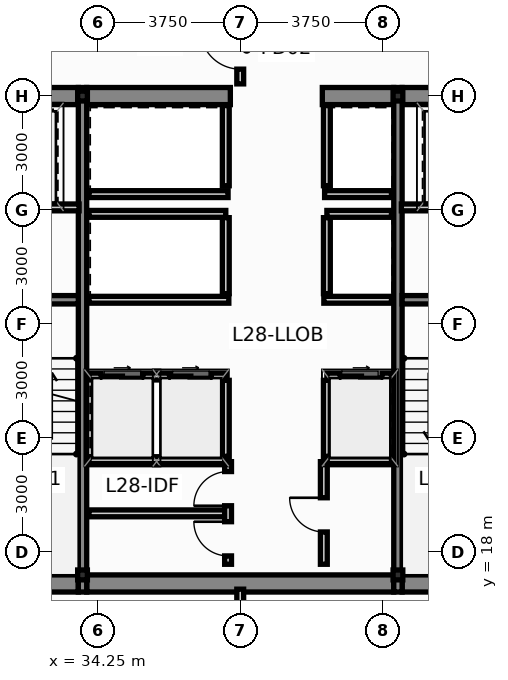
"""IFC4 building model, lengths in metres.
Left out: names, types, materials, properties, quantities, classifications, styles, units other than length and angle.
Written with IfcOpenShell. Run it as: python <this file> out.ifc"""

import sys

from ifc_helpers import new_model, si_unit, direction, frame, frame_2d, origin, origin_2d, place, context, subcontext, project, spatial, rectangle, i_section, extrude, source, transform, mapped, element, fill, save


model = new_model("IFC4")
c1 = context("Model", 3, precision=1e-05, world=origin(), true_north=direction((0.0, 1.0)))
c2 = subcontext(c1, "Body", "Model", "MODEL_VIEW")
j1 = project(units=[si_unit("LENGTHUNIT", "METRE"), si_unit("PLANEANGLEUNIT", "RADIAN")], contexts=[c1])
p1 = place(None, origin())
s1 = spatial("IfcSite", under=j1, at=p1, CompositionType="ELEMENT")
p2 = place(p1, origin())
s2 = spatial("IfcBuilding", under=s1, at=p2, CompositionType="ELEMENT")
p3 = place(p2, frame((0.0, 0.0, 109.05)))
s3 = spatial("IfcBuildingStorey", under=s2, at=p3, CompositionType="ELEMENT", Elevation=109.05)
m1 = source(origin(), c2, "Body", "SweptSolid", [
    extrude(i_section(OverallWidth=0.256, OverallDepth=0.26, WebThickness=0.01, FlangeThickness=0.017, at=origin_2d()), origin(), (0.0, 0.0, 1.0), 3.65),
])
for number, where, z_axis, x_axis in (
    (1, (33.85, 17.4, 0.0), (0.0, 0.0, 1.0), (1.0, 0.0, 0.0)),
    (2, (42.15, 17.4, 0.0), (0.0, 0.0, 1.0), (1.0, 0.0, 0.0)),
    (3, (33.85, 30.0, 0.0), (0.0, 0.0, 1.0), (1.0, 0.0, 0.0)),
    (4, (42.15, 30.0, 0.0), (0.0, 0.0, 1.0), (1.0, 0.0, 0.0)),
):
    element("IfcColumn", number, at=place(p3, frame(where, z_axis=z_axis, x_axis=x_axis)), inside=s3, PredefinedType="COLUMN", context=c2, shape_type="MappedRepresentation", body=[
        mapped(m1, transform((0.0, 0.0, 0.0), scale=1.0)),
    ])
p4 = place(p3, frame((30.84, 17.175, 0.0), z_axis=(0.0, 0.0, 1.0), x_axis=(1.0, 0.0, 0.0)))
e5 = element("IfcWall", 5, at=p4, inside=s3, PredefinedType="SHEAR", context=c2, shape_type="SweptSolid", body=[
    extrude(rectangle(XDim=2.9, YDim=0.45, at=frame_2d((1.45, 0.0))), origin(), (0.0, 0.0, 1.0), 3.65),
])
p5 = place(p3, frame((33.96, 17.175, 0.0), z_axis=(0.0, 0.0, 1.0), x_axis=(1.0, 0.0, 0.0)))
e6 = element("IfcWall", 6, at=p5, inside=s3, PredefinedType="SHEAR", context=c2, shape_type="SweptSolid", body=[
    extrude(rectangle(XDim=8.08, YDim=0.45, at=frame_2d((4.04, 0.0))), origin(), (0.0, 0.0, 1.0), 3.65),
])
for number, where, z_axis, x_axis in (
    (7, (42.26, 17.175, 0.0), (0.0, 0.0, 1.0), (1.0, 0.0, 0.0)),
    (8, (30.84, 30.0, 0.0), (0.0, 0.0, 1.0), (1.0, 0.0, 0.0)),
):
    element("IfcWall", number, at=place(p3, frame(where, z_axis=z_axis, x_axis=x_axis)), inside=s3, PredefinedType="SHEAR", context=c2, shape_type="SweptSolid", body=[
        extrude(rectangle(XDim=2.9, YDim=0.45, at=frame_2d((1.45, 0.0))), origin(), (0.0, 0.0, 1.0), 3.65),
    ])
p6 = place(p3, frame((33.96, 30.0, 0.0), z_axis=(0.0, 0.0, 1.0), x_axis=(1.0, 0.0, 0.0)))
e9 = element("IfcWall", 9, at=p6, inside=s3, PredefinedType="SHEAR", context=c2, shape_type="SweptSolid", body=[
    extrude(rectangle(XDim=3.78, YDim=0.45, at=frame_2d((1.89, 0.0))), origin(), (0.0, 0.0, 1.0), 3.65),
])
p7 = place(p3, frame((40.16, 30.0, 0.0), z_axis=(0.0, 0.0, 1.0), x_axis=(1.0, 0.0, 0.0)))
e10 = element("IfcWall", 10, at=p7, inside=s3, PredefinedType="SHEAR", context=c2, shape_type="SweptSolid", body=[
    extrude(rectangle(XDim=1.88, YDim=0.45, at=frame_2d((0.94, 0.0))), origin(), (0.0, 0.0, 1.0), 3.65),
])
p8 = place(p3, frame((42.26, 30.0, 0.0), z_axis=(0.0, 0.0, 1.0), x_axis=(1.0, 0.0, 0.0)))
e11 = element("IfcWall", 11, at=p8, inside=s3, PredefinedType="SHEAR", context=c2, shape_type="SweptSolid", body=[
    extrude(rectangle(XDim=2.9, YDim=0.45, at=frame_2d((1.45, 0.0))), origin(), (0.0, 0.0, 1.0), 3.65),
])
for number, where, z_axis, x_axis in (
    (12, (33.85, 16.95, 0.0), (0.0, 0.0, 1.0), (0.0, 1.0, 0.0)),
    (13, (42.15, 16.95, 0.0), (0.0, 0.0, 1.0), (0.0, 1.0, 0.0)),
):
    element("IfcWall", number, at=place(p3, frame(where, z_axis=z_axis, x_axis=x_axis)), inside=s3, PredefinedType="SHEAR", context=c2, shape_type="SweptSolid", body=[
        extrude(rectangle(XDim=13.275, YDim=0.22, at=frame_2d((6.638, 0.0))), origin(), (0.0, 0.0, 1.0), 3.65),
    ])
for number, where, z_axis, x_axis in (
    (14, (30.84, 24.64, 0.0), (0.0, 0.0, 1.0), (1.0, 0.0, 0.0)),
    (15, (42.26, 24.64, 0.0), (0.0, 0.0, 1.0), (1.0, 0.0, 0.0)),
):
    element("IfcWall", number, at=place(p3, frame(where, z_axis=z_axis, x_axis=x_axis)), inside=s3, PredefinedType="SHEAR", context=c2, shape_type="SweptSolid", body=[
        extrude(rectangle(XDim=2.9, YDim=0.22, at=frame_2d((1.45, 0.0))), origin(), (0.0, 0.0, 1.0), 3.65),
    ])
p9 = place(p3, frame((34.02, 22.62, 0.0), z_axis=(0.0, 0.0, 1.0), x_axis=(1.0, 0.0, 0.0)))
e16 = element("IfcWall", 16, at=p9, inside=s3, PredefinedType="PARTITIONING", context=c2, shape_type="SweptSolid", body=[
    extrude(rectangle(XDim=3.6, YDim=0.18, at=frame_2d((1.8, 0.0))), origin(), (0.0, 0.0, 1.0), 3.4),
])
p10 = place(p9, frame((0.32, 0.0, 0.0)))
e17 = element("IfcOpeningElement", 17, at=p10, cuts=e16, PredefinedType="OPENING", context=c2, shape_type="SweptSolid", body=[
    extrude(rectangle(XDim=1.1, YDim=2.2, at=frame_2d((0.55, 1.1))), frame((0.0, 0.102, 0.0), z_axis=(0.0, -1.0, 0.0), x_axis=(1.0, 0.0, 0.0)), (0.0, 0.0, 1.0), 0.204),
])
p11 = place(p9, frame((2.12, 0.0, 0.0)))
e18 = element("IfcOpeningElement", 18, at=p11, cuts=e16, PredefinedType="OPENING", context=c2, shape_type="SweptSolid", body=[
    extrude(rectangle(XDim=1.1, YDim=2.2, at=frame_2d((0.55, 1.1))), frame((0.0, 0.102, 0.0), z_axis=(0.0, -1.0, 0.0), x_axis=(1.0, 0.0, 0.0)), (0.0, 0.0, 1.0), 0.204),
])
p12 = place(p3, frame((40.28, 22.62, 0.0), z_axis=(0.0, 0.0, 1.0), x_axis=(1.0, 0.0, 0.0)))
e19 = element("IfcWall", 19, at=p12, inside=s3, PredefinedType="PARTITIONING", context=c2, shape_type="SweptSolid", body=[
    extrude(rectangle(XDim=1.7, YDim=0.18, at=frame_2d((0.85, 0.0))), origin(), (0.0, 0.0, 1.0), 3.4),
])
p13 = place(p12, frame((0.35, 0.0, 0.0)))
e20 = element("IfcOpeningElement", 20, at=p13, cuts=e19, PredefinedType="OPENING", context=c2, shape_type="SweptSolid", body=[
    extrude(rectangle(XDim=1.1, YDim=2.2, at=frame_2d((0.55, 1.1))), frame((0.0, 0.102, 0.0), z_axis=(0.0, -1.0, 0.0), x_axis=(1.0, 0.0, 0.0)), (0.0, 0.0, 1.0), 0.204),
])
for number, where, z_axis, x_axis in (
    (21, (37.62, 20.52, 0.0), (0.0, 0.0, 1.0), (0.0, 1.0, 0.0)),
    (22, (40.28, 20.52, 0.0), (0.0, 0.0, 1.0), (0.0, 1.0, 0.0)),
):
    element("IfcWall", number, at=place(p3, frame(where, z_axis=z_axis, x_axis=x_axis)), inside=s3, PredefinedType="PARTITIONING", context=c2, shape_type="SweptSolid", body=[
        extrude(rectangle(XDim=2.0, YDim=0.18, at=frame_2d((1.0, 0.0))), origin(), (0.0, 0.0, 1.0), 3.4),
    ])
p14 = place(p3, frame((34.02, 26.9, 0.0), z_axis=(0.0, 0.0, 1.0), x_axis=(1.0, 0.0, 0.0)))
e23 = element("IfcWall", 23, at=p14, inside=s3, PredefinedType="PARTITIONING", context=c2, shape_type="SweptSolid", body=[
    extrude(rectangle(XDim=3.6, YDim=0.18, at=frame_2d((1.8, 0.0))), origin(), (0.0, 0.0, 1.0), 3.4),
])
p15 = place(p3, frame((40.28, 26.9, 0.0), z_axis=(0.0, 0.0, 1.0), x_axis=(1.0, 0.0, 0.0)))
e24 = element("IfcWall", 24, at=p15, inside=s3, PredefinedType="PARTITIONING", context=c2, shape_type="SweptSolid", body=[
    extrude(rectangle(XDim=1.7, YDim=0.18, at=frame_2d((0.85, 0.0))), origin(), (0.0, 0.0, 1.0), 3.4),
])
for number, where, z_axis, x_axis in (
    (25, (37.62, 24.8, 0.0), (0.0, 0.0, 1.0), (0.0, 1.0, 0.0)),
    (26, (40.28, 24.8, 0.0), (0.0, 0.0, 1.0), (0.0, 1.0, 0.0)),
):
    element("IfcWall", number, at=place(p3, frame(where, z_axis=z_axis, x_axis=x_axis)), inside=s3, PredefinedType="PARTITIONING", context=c2, shape_type="SweptSolid", body=[
        extrude(rectangle(XDim=2.0, YDim=0.18, at=frame_2d((1.0, 0.0))), origin(), (0.0, 0.0, 1.0), 3.4),
    ])
p16 = place(p3, frame((34.02, 24.64, 0.0), z_axis=(0.0, 0.0, 1.0), x_axis=(1.0, 0.0, 0.0)))
e27 = element("IfcWall", 27, at=p16, inside=s3, PredefinedType="PARTITIONING", context=c2, shape_type="SweptSolid", body=[
    extrude(rectangle(XDim=3.68, YDim=0.18, at=frame_2d((1.84, 0.0))), origin(), (0.0, 0.0, 1.0), 3.4),
])
p17 = place(p3, frame((40.2, 24.64, 0.0), z_axis=(0.0, 0.0, 1.0), x_axis=(1.0, 0.0, 0.0)))
e28 = element("IfcWall", 28, at=p17, inside=s3, PredefinedType="PARTITIONING", context=c2, shape_type="SweptSolid", body=[
    extrude(rectangle(XDim=1.78, YDim=0.18, at=frame_2d((0.89, 0.0))), origin(), (0.0, 0.0, 1.0), 3.4),
])
p18 = place(p3, frame((34.02, 27.42, 0.0), z_axis=(0.0, 0.0, 1.0), x_axis=(1.0, 0.0, 0.0)))
e29 = element("IfcWall", 29, at=p18, inside=s3, PredefinedType="PARTITIONING", context=c2, shape_type="SweptSolid", body=[
    extrude(rectangle(XDim=3.66, YDim=0.18, at=frame_2d((1.83, 0.0))), origin(), (0.0, 0.0, 1.0), 3.4),
])
p19 = place(p3, frame((40.22, 27.42, 0.0), z_axis=(0.0, 0.0, 1.0), x_axis=(1.0, 0.0, 0.0)))
e30 = element("IfcWall", 30, at=p19, inside=s3, PredefinedType="PARTITIONING", context=c2, shape_type="SweptSolid", body=[
    extrude(rectangle(XDim=1.76, YDim=0.18, at=frame_2d((0.88, 0.0))), origin(), (0.0, 0.0, 1.0), 3.4),
])
for number, where, z_axis, x_axis in (
    (31, (37.62, 27.64, 0.0), (0.0, 0.0, 1.0), (0.0, 1.0, 0.0)),
    (32, (40.28, 27.64, 0.0), (0.0, 0.0, 1.0), (0.0, 1.0, 0.0)),
):
    element("IfcWall", number, at=place(p3, frame(where, z_axis=z_axis, x_axis=x_axis)), inside=s3, PredefinedType="PARTITIONING", context=c2, shape_type="SweptSolid", body=[
        extrude(rectangle(XDim=2.11, YDim=0.18, at=frame_2d((1.055, 0.0))), origin(), (0.0, 0.0, 1.0), 3.4),
    ])
for number, where, z_axis, x_axis in (
    (33, (30.86, 27.07, 0.0), (0.0, 0.0, 1.0), (1.0, 0.0, 0.0)),
    (34, (42.24, 27.07, 0.0), (0.0, 0.0, 1.0), (1.0, 0.0, 0.0)),
):
    element("IfcWall", number, at=place(p3, frame(where, z_axis=z_axis, x_axis=x_axis)), inside=s3, PredefinedType="PARTITIONING", context=c2, shape_type="SweptSolid", body=[
        extrude(rectangle(XDim=2.9, YDim=0.18, at=frame_2d((1.45, 0.0))), origin(), (0.0, 0.0, 1.0), 3.4),
    ])
p20 = place(p3, frame((34.02, 20.42, 0.0), z_axis=(0.0, 0.0, 1.0), x_axis=(1.0, 0.0, 0.0)))
e35 = element("IfcWall", 35, at=p20, inside=s3, PredefinedType="PARTITIONING", context=c2, shape_type="SweptSolid", body=[
    extrude(rectangle(XDim=3.64, YDim=0.18, at=frame_2d((1.82, 0.0))), origin(), (0.0, 0.0, 1.0), 3.4),
])
p21 = place(p3, frame((40.22, 20.42, 0.0), z_axis=(0.0, 0.0, 1.0), x_axis=(1.0, 0.0, 0.0)))
e36 = element("IfcWall", 36, at=p21, inside=s3, PredefinedType="PARTITIONING", context=c2, shape_type="SweptSolid", body=[
    extrude(rectangle(XDim=1.76, YDim=0.18, at=frame_2d((0.88, 0.0))), origin(), (0.0, 0.0, 1.0), 3.4),
])
p22 = place(p3, frame((34.02, 19.02, 0.0), z_axis=(0.0, 0.0, 1.0), x_axis=(1.0, 0.0, 0.0)))
e37 = element("IfcWall", 37, at=p22, inside=s3, PredefinedType="PARTITIONING", context=c2, shape_type="SweptSolid", body=[
    extrude(rectangle(XDim=3.58, YDim=0.18, at=frame_2d((1.79, 0.0))), origin(), (0.0, 0.0, 1.0), 3.4),
])
p23 = place(p3, frame((37.68, 17.68, 0.0), z_axis=(0.0, 0.0, 1.0), x_axis=(0.0, 1.0, 0.0)))
e38 = element("IfcWall", 38, at=p23, inside=s3, PredefinedType="PARTITIONING", context=c2, shape_type="SweptSolid", body=[
    extrude(rectangle(XDim=2.7, YDim=0.18, at=frame_2d((1.35, 0.0))), origin(), (0.0, 0.0, 1.0), 3.4),
])
p24 = place(p23, frame((0.22, 0.0, 0.0)))
e39 = element("IfcOpeningElement", 39, at=p24, cuts=e38, PredefinedType="OPENING", context=c2, shape_type="SweptSolid", body=[
    extrude(rectangle(XDim=0.9, YDim=2.1, at=frame_2d((0.45, 1.05))), frame((0.0, 0.102, 0.0), z_axis=(0.0, -1.0, 0.0), x_axis=(1.0, 0.0, 0.0)), (0.0, 0.0, 1.0), 0.204),
])
p25 = place(p23, frame((1.54, 0.0, 0.0)))
e40 = element("IfcOpeningElement", 40, at=p25, cuts=e38, PredefinedType="OPENING", context=c2, shape_type="SweptSolid", body=[
    extrude(rectangle(XDim=0.9, YDim=2.1, at=frame_2d((0.45, 1.05))), frame((0.0, 0.102, 0.0), z_axis=(0.0, -1.0, 0.0), x_axis=(1.0, 0.0, 0.0)), (0.0, 0.0, 1.0), 0.204),
])
p26 = place(p3, frame((40.2, 17.68, 0.0), z_axis=(0.0, 0.0, 1.0), x_axis=(0.0, 1.0, 0.0)))
e41 = element("IfcWall", 41, at=p26, inside=s3, PredefinedType="PARTITIONING", context=c2, shape_type="SweptSolid", body=[
    extrude(rectangle(XDim=2.7, YDim=0.18, at=frame_2d((1.35, 0.0))), origin(), (0.0, 0.0, 1.0), 3.4),
])
p27 = place(p26, frame((0.85, 0.0, 0.0)))
e42 = element("IfcOpeningElement", 42, at=p27, cuts=e41, PredefinedType="OPENING", context=c2, shape_type="SweptSolid", body=[
    extrude(rectangle(XDim=0.9, YDim=2.1, at=frame_2d((0.45, 1.05))), frame((0.0, 0.102, 0.0), z_axis=(0.0, -1.0, 0.0), x_axis=(1.0, 0.0, 0.0)), (0.0, 0.0, 1.0), 0.204),
])
p28 = place(p3, frame((38.0, 15.205, 0.0), z_axis=(0.0, 0.0, 1.0), x_axis=(0.0, 1.0, 0.0)))
e43 = element("IfcWall", 43, at=p28, inside=s3, PredefinedType="PARTITIONING", context=c2, shape_type="SweptSolid", body=[
    extrude(rectangle(XDim=1.82, YDim=0.18, at=frame_2d((0.91, 0.0))), origin(), (0.0, 0.0, 1.0), 3.4),
])
p29 = place(p28, frame((0.385, 0.0, 0.0)))
e44 = element("IfcOpeningElement", 44, at=p29, cuts=e43, PredefinedType="OPENING", context=c2, shape_type="SweptSolid", body=[
    extrude(rectangle(XDim=1.05, YDim=2.15, at=frame_2d((0.525, 1.075))), frame((0.0, 0.102, 0.0), z_axis=(0.0, -1.0, 0.0), x_axis=(1.0, 0.0, 0.0)), (0.0, 0.0, 1.0), 0.204),
])
p30 = place(p3, frame((38.0, 30.32, 0.0), z_axis=(0.0, 0.0, 1.0), x_axis=(0.0, 1.0, 0.0)))
e45 = element("IfcWall", 45, at=p30, inside=s3, PredefinedType="PARTITIONING", context=c2, shape_type="SweptSolid", body=[
    extrude(rectangle(XDim=1.825, YDim=0.18, at=frame_2d((0.913, 0.0))), origin(), (0.0, 0.0, 1.0), 3.4),
])
p31 = place(p30, frame((0.388, 0.0, 0.0)))
e46 = element("IfcOpeningElement", 46, at=p31, cuts=e45, PredefinedType="OPENING", context=c2, shape_type="SweptSolid", body=[
    extrude(rectangle(XDim=1.05, YDim=2.15, at=frame_2d((0.525, 1.075))), frame((0.0, 0.102, 0.0), z_axis=(0.0, -1.0, 0.0), x_axis=(1.0, 0.0, 0.0)), (0.0, 0.0, 1.0), 0.204),
])
p32 = place(p10, origin())
e47 = element("IfcDoor", 47, at=p32, inside=s3, OperationType="SLIDING_TO_LEFT", PredefinedType="DOOR", context=c2, shape_type="SweptSolid", body=[
    extrude(rectangle(XDim=1.1, YDim=2.2, at=frame_2d((0.55, 1.1))), frame((0.0, 0.025, 0.0), z_axis=(0.0, -1.0, 0.0), x_axis=(1.0, 0.0, 0.0)), (0.0, 0.0, 1.0), 0.05),
])
fill(e17, e47)
p33 = place(p11, origin())
e48 = element("IfcDoor", 48, at=p33, inside=s3, OperationType="SLIDING_TO_RIGHT", PredefinedType="DOOR", context=c2, shape_type="SweptSolid", body=[
    extrude(rectangle(XDim=1.1, YDim=2.2, at=frame_2d((0.55, 1.1))), frame((0.0, 0.025, 0.0), z_axis=(0.0, -1.0, 0.0), x_axis=(1.0, 0.0, 0.0)), (0.0, 0.0, 1.0), 0.05),
])
fill(e18, e48)
p34 = place(p13, origin())
e49 = element("IfcDoor", 49, at=p34, inside=s3, OperationType="SLIDING_TO_LEFT", PredefinedType="DOOR", context=c2, shape_type="SweptSolid", body=[
    extrude(rectangle(XDim=1.1, YDim=2.2, at=frame_2d((0.55, 1.1))), frame((0.0, 0.025, 0.0), z_axis=(0.0, -1.0, 0.0), x_axis=(1.0, 0.0, 0.0)), (0.0, 0.0, 1.0), 0.05),
])
fill(e20, e49)
p35 = place(p24, origin())
e50 = element("IfcDoor", 50, at=p35, inside=s3, OperationType="SINGLE_SWING_RIGHT", PredefinedType="DOOR", context=c2, shape_type="SweptSolid", body=[
    extrude(rectangle(XDim=0.9, YDim=2.1, at=frame_2d((0.45, 1.05))), frame((0.0, 0.025, 0.0), z_axis=(0.0, -1.0, 0.0), x_axis=(1.0, 0.0, 0.0)), (0.0, 0.0, 1.0), 0.05),
])
fill(e39, e50)
p36 = place(p25, origin())
e51 = element("IfcDoor", 51, at=p36, inside=s3, OperationType="SINGLE_SWING_LEFT", PredefinedType="DOOR", context=c2, shape_type="SweptSolid", body=[
    extrude(rectangle(XDim=0.9, YDim=2.1, at=frame_2d((0.45, 1.05))), frame((0.0, 0.025, 0.0), z_axis=(0.0, -1.0, 0.0), x_axis=(1.0, 0.0, 0.0)), (0.0, 0.0, 1.0), 0.05),
])
fill(e40, e51)
p37 = place(p27, origin())
e52 = element("IfcDoor", 52, at=p37, inside=s3, OperationType="SINGLE_SWING_RIGHT", PredefinedType="DOOR", context=c2, shape_type="SweptSolid", body=[
    extrude(rectangle(XDim=0.9, YDim=2.1, at=frame_2d((0.45, 1.05))), frame((0.0, 0.025, 0.0), z_axis=(0.0, -1.0, 0.0), x_axis=(1.0, 0.0, 0.0)), (0.0, 0.0, 1.0), 0.05),
])
fill(e42, e52)
p38 = place(p31, origin())
e53 = element("IfcDoor", 53, at=p38, inside=s3, OperationType="SINGLE_SWING_RIGHT", PredefinedType="DOOR", context=c2, shape_type="SweptSolid", body=[
    extrude(rectangle(XDim=1.05, YDim=2.15, at=frame_2d((0.525, 1.075))), frame((0.0, 0.025, 0.0), z_axis=(0.0, -1.0, 0.0), x_axis=(1.0, 0.0, 0.0)), (0.0, 0.0, 1.0), 0.05),
])
fill(e46, e53)
save(model, sys.argv[1])
